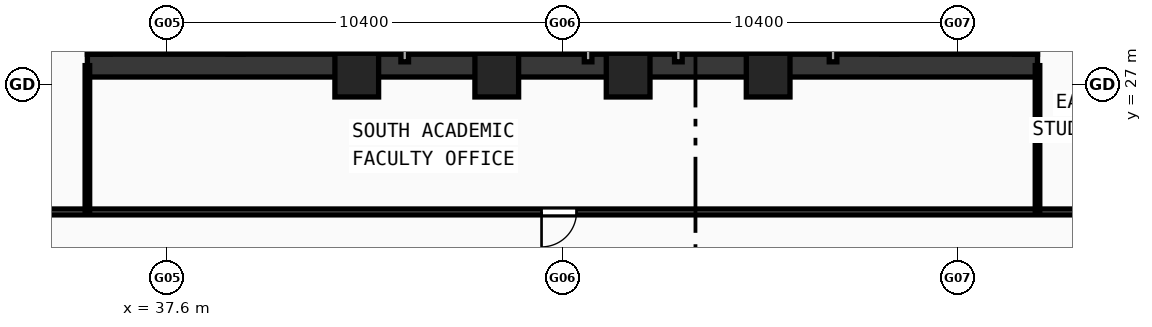
"""IFC4 building model, lengths in metres.
Left out: names, types, materials, properties, quantities, classifications, styles, units other than length and angle.
Written with IfcOpenShell. Run it as: python <this file> out.ifc"""

import sys

from ifc_helpers import new_model, si_unit, direction, frame, frame_2d, origin, origin_2d, place, context, subcontext, project, spatial, rectangle, hollow_rectangle, extrude, source, transform, mapped, element, fill, save


model = new_model("IFC4")
c1 = context("Model", 3, precision=1e-05, world=origin(), true_north=direction((0.0, 1.0)))
c2 = subcontext(c1, "Body", "Model", "MODEL_VIEW")
j1 = project(units=[si_unit("LENGTHUNIT", "METRE"), si_unit("PLANEANGLEUNIT", "RADIAN")], contexts=[c1])
p1 = place(None, origin())
s1 = spatial("IfcSite", under=j1, at=p1, CompositionType="ELEMENT")
p2 = place(p1, origin())
s2 = spatial("IfcBuilding", under=s1, at=p2, CompositionType="ELEMENT")
p3 = place(p2, frame((0.0, 0.0, 170.31)))
s3 = spatial("IfcBuildingStorey", under=s2, at=p3, CompositionType="ELEMENT", Elevation=170.31)
p4 = place(p3, frame((35.5, 27.5, 0.0), z_axis=(0.0, 0.0, 1.0), x_axis=(1.0, 0.0, 0.0)))
e1 = element("IfcWall", 1, at=p4, inside=s3, PredefinedType="SHEAR", context=c2, shape_type="SweptSolid", body=[
    extrude(rectangle(XDim=25.0, YDim=0.6, at=frame_2d((12.5, 0.0))), origin(), (0.0, 0.0, 1.0), 5.57),
])
for number, where, z_axis, x_axis in (
    (2, (35.8, 27.8, 0.0), (0.0, 0.0, 1.0), (0.0, 1.0, 0.0)),
    (3, (60.2, 27.8, 0.0), (0.0, 0.0, 1.0), (0.0, 1.0, 0.0)),
):
    element("IfcWall", number, at=place(p3, frame(where, z_axis=z_axis, x_axis=x_axis)), inside=s3, PredefinedType="SHEAR", context=c2, shape_type="SweptSolid", body=[
        extrude(rectangle(XDim=12.1, YDim=0.6, at=frame_2d((6.05, 0.0))), origin(), (0.0, 0.0, 1.0), 5.57),
    ])
p5 = place(p3, frame((39.4, 27.8, 0.0), z_axis=(0.0, 0.0, 1.0), x_axis=(0.0, 1.0, 0.0)))
e4 = element("IfcWall", 4, at=p5, inside=s3, PredefinedType="SHEAR", context=c2, shape_type="SweptSolid", body=[
    extrude(rectangle(XDim=12.1, YDim=0.4, at=frame_2d((6.05, 0.0))), origin(), (0.0, 0.0, 1.0), 5.57),
])
p6 = place(p5, frame((9.95, 0.0, 0.0)))
e5 = element("IfcOpeningElement", 5, at=p6, cuts=e4, PredefinedType="OPENING", context=c2, shape_type="SweptSolid", body=[
    extrude(rectangle(XDim=1.1, YDim=2.1, at=frame_2d((0.55, 1.05))), frame((0.0, 0.21, 0.0), z_axis=(0.0, -1.0, 0.0), x_axis=(1.0, 0.0, 0.0)), (0.0, 0.0, 1.0), 0.42),
])
p7 = place(p3, frame((56.6, 27.8, 0.0), z_axis=(0.0, 0.0, 1.0), x_axis=(0.0, 1.0, 0.0)))
e6 = element("IfcWall", 6, at=p7, inside=s3, PredefinedType="SHEAR", context=c2, shape_type="SweptSolid", body=[
    extrude(rectangle(XDim=12.1, YDim=0.4, at=frame_2d((6.05, 0.0))), origin(), (0.0, 0.0, 1.0), 5.57),
])
p8 = place(p7, frame((9.95, 0.0, 0.0)))
e7 = element("IfcOpeningElement", 7, at=p8, cuts=e6, PredefinedType="OPENING", context=c2, shape_type="SweptSolid", body=[
    extrude(rectangle(XDim=1.1, YDim=2.1, at=frame_2d((0.55, 1.05))), frame((0.0, 0.21, 0.0), z_axis=(0.0, -1.0, 0.0), x_axis=(1.0, 0.0, 0.0)), (0.0, 0.0, 1.0), 0.42),
])
m1 = source(origin(), c2, "Body", "SweptSolid", [
    extrude(hollow_rectangle(XDim=1.15, YDim=1.15, WallThickness=0.048, at=origin_2d()), origin(), (0.0, 0.0, 1.0), 5.83),
])
for number, where, z_axis, x_axis in (
    (8, (42.588, 27.25, -0.26), (0.0, 0.0, 1.0), (1.0, 0.0, 0.0)),
    (9, (46.272, 27.25, -0.26), (0.0, 0.0, 1.0), (1.0, 0.0, 0.0)),
    (10, (49.729, 27.25, -0.26), (0.0, 0.0, 1.0), (1.0, 0.0, 0.0)),
    (11, (53.412, 27.25, -0.26), (0.0, 0.0, 1.0), (1.0, 0.0, 0.0)),
):
    element("IfcColumn", number, at=place(p3, frame(where, z_axis=z_axis, x_axis=x_axis)), inside=s3, PredefinedType="COLUMN", context=c2, shape_type="MappedRepresentation", body=[
        mapped(m1, transform((0.0, 0.0, 0.0), scale=1.0)),
    ])
p9 = place(p3, frame((43.85, 27.6, 0.0), z_axis=(0.0, 0.0, 1.0), x_axis=(0.0, 1.0, 0.0)))
e12 = element("IfcWall", 12, at=p9, inside=s3, PredefinedType="SOLIDWALL", context=c2, shape_type="SweptSolid", body=[
    extrude(rectangle(XDim=6.22, YDim=0.2, at=frame_2d((3.11, 0.0))), origin(), (0.0, 0.0, 1.0), 5.57),
])
p10 = place(p9, frame((2.25, 0.0, 0.0)))
e13 = element("IfcOpeningElement", 13, at=p10, cuts=e12, PredefinedType="OPENING", context=c2, shape_type="SweptSolid", body=[
    extrude(rectangle(XDim=1.05, YDim=2.1, at=frame_2d((0.525, 1.05))), frame((0.0, 0.11, 0.0), z_axis=(0.0, -1.0, 0.0), x_axis=(1.0, 0.0, 0.0)), (0.0, 0.0, 1.0), 0.22),
])
p11 = place(p3, frame((53.68, 27.6, 0.0), z_axis=(0.0, 0.0, 1.0), x_axis=(0.0, 1.0, 0.0)))
e14 = element("IfcWall", 14, at=p11, inside=s3, PredefinedType="SOLIDWALL", context=c2, shape_type="SweptSolid", body=[
    extrude(rectangle(XDim=9.05, YDim=0.2, at=frame_2d((4.525, 0.0))), origin(), (0.0, 0.0, 1.0), 2.22),
])
p12 = place(p11, frame((6.9, 0.0, 0.0)))
e15 = element("IfcOpeningElement", 15, at=p12, cuts=e14, PredefinedType="OPENING", context=c2, shape_type="SweptSolid", body=[
    extrude(rectangle(XDim=1.05, YDim=2.1, at=frame_2d((0.525, 1.05))), frame((0.0, 0.11, 0.0), z_axis=(0.0, -1.0, 0.0), x_axis=(1.0, 0.0, 0.0)), (0.0, 0.0, 1.0), 0.22),
])
p13 = place(p3, frame((51.05, 27.6, 0.0), z_axis=(0.0, 0.0, 1.0), x_axis=(0.0, 1.0, 0.0)))
e16 = element("IfcWall", 16, at=p13, inside=s3, PredefinedType="SOLIDWALL", context=c2, shape_type="SweptSolid", body=[
    extrude(rectangle(XDim=2.12, YDim=0.2, at=frame_2d((1.06, 0.0))), origin(), (0.0, 0.0, 1.0), 5.57),
])
p14 = place(p3, frame((46.225, 27.6, 0.0), z_axis=(0.0, 0.0, 1.0), x_axis=(0.0, 1.0, 0.0)))
e17 = element("IfcWall", 17, at=p14, inside=s3, PredefinedType="SOLIDWALL", context=c2, shape_type="SweptSolid", body=[
    extrude(rectangle(XDim=2.12, YDim=0.2, at=frame_2d((1.06, 0.0))), origin(), (0.0, 0.0, 1.0), 2.22),
])
for number, where, z_axis, x_axis in (
    (18, (48.675, 27.6, 0.0), (0.0, 0.0, 1.0), (0.0, 1.0, 0.0)),
    (19, (55.12, 27.6, 0.0), (0.0, 0.0, 1.0), (0.0, 1.0, 0.0)),
):
    element("IfcWall", number, at=place(p3, frame(where, z_axis=z_axis, x_axis=x_axis)), inside=s3, PredefinedType="SOLIDWALL", context=c2, shape_type="SweptSolid", body=[
        extrude(rectangle(XDim=2.12, YDim=0.2, at=frame_2d((1.06, 0.0))), origin(), (0.0, 0.0, 1.0), 5.57),
    ])
p15 = place(p3, frame((42.32, 27.6, 0.0), z_axis=(0.0, 0.0, 1.0), x_axis=(0.0, 1.0, 0.0)))
e20 = element("IfcWall", 20, at=p15, inside=s3, PredefinedType="PARTITIONING", context=c2, shape_type="SweptSolid", body=[
    extrude(rectangle(XDim=5.9, YDim=0.155, at=frame_2d((2.95, 0.0))), origin(), (0.0, 0.0, 1.0), 2.22),
])
p16 = place(p15, frame((3.2, 0.0, 0.0)))
e21 = element("IfcOpeningElement", 21, at=p16, cuts=e20, PredefinedType="OPENING", context=c2, shape_type="SweptSolid", body=[
    extrude(rectangle(XDim=0.94, YDim=2.1, at=frame_2d((0.47, 1.05))), frame((0.0, 0.087, 0.0), z_axis=(0.0, -1.0, 0.0), x_axis=(1.0, 0.0, 0.0)), (0.0, 0.0, 1.0), 0.175),
])
p17 = place(p3, frame((31.45, 23.65, 0.0), z_axis=(0.0, 0.0, 1.0), x_axis=(1.0, 0.0, 0.0)))
e22 = element("IfcWall", 22, at=p17, inside=s3, PredefinedType="PARTITIONING", context=c2, shape_type="SweptSolid", body=[
    extrude(rectangle(XDim=33.1, YDim=0.155, at=frame_2d((16.55, 0.0))), origin(), (0.0, 0.0, 1.0), 2.22),
])
p18 = place(p17, frame((16.0, 0.0, 0.0)))
e23 = element("IfcOpeningElement", 23, at=p18, cuts=e22, PredefinedType="OPENING", context=c2, shape_type="SweptSolid", body=[
    extrude(rectangle(XDim=0.92, YDim=2.1, at=frame_2d((0.46, 1.05))), frame((0.0, 0.087, 0.0), z_axis=(0.0, -1.0, 0.0), x_axis=(1.0, 0.0, 0.0)), (0.0, 0.0, 1.0), 0.175),
])
for number, where, z_axis, x_axis in (
    (24, (35.5, 23.65, 0.0), (0.0, 0.0, 1.0), (0.0, 1.0, 0.0)),
    (25, (60.5, 23.65, 0.0), (0.0, 0.0, 1.0), (0.0, 1.0, 0.0)),
):
    element("IfcWall", number, at=place(p3, frame(where, z_axis=z_axis, x_axis=x_axis)), inside=s3, PredefinedType="PARTITIONING", context=c2, shape_type="SweptSolid", body=[
        extrude(rectangle(XDim=3.85, YDim=0.12, at=frame_2d((1.925, 0.0))), origin(), (0.0, 0.0, 1.0), 5.17),
    ])
m2 = source(origin(), c2, "Body", "SweptSolid", [
    extrude(rectangle(XDim=0.92, YDim=2.1, at=frame_2d((0.46, 1.05))), frame((0.0, 0.025, 0.0), z_axis=(0.0, -1.0, 0.0), x_axis=(1.0, 0.0, 0.0)), (0.0, 0.0, 1.0), 0.05),
])
p19 = place(p18, frame((0.92, 0.0, 0.0), z_axis=(0.0, 0.0, 1.0), x_axis=(-1.0, 0.0, 0.0)))
e26 = element("IfcDoor", 26, at=p19, inside=s3, OperationType="SINGLE_SWING_RIGHT", PredefinedType="DOOR", context=c2, shape_type="MappedRepresentation", body=[
    mapped(m2, transform((0.0, 0.0, 0.0), scale=1.0)),
])
fill(e23, e26)
save(model, sys.argv[1])
